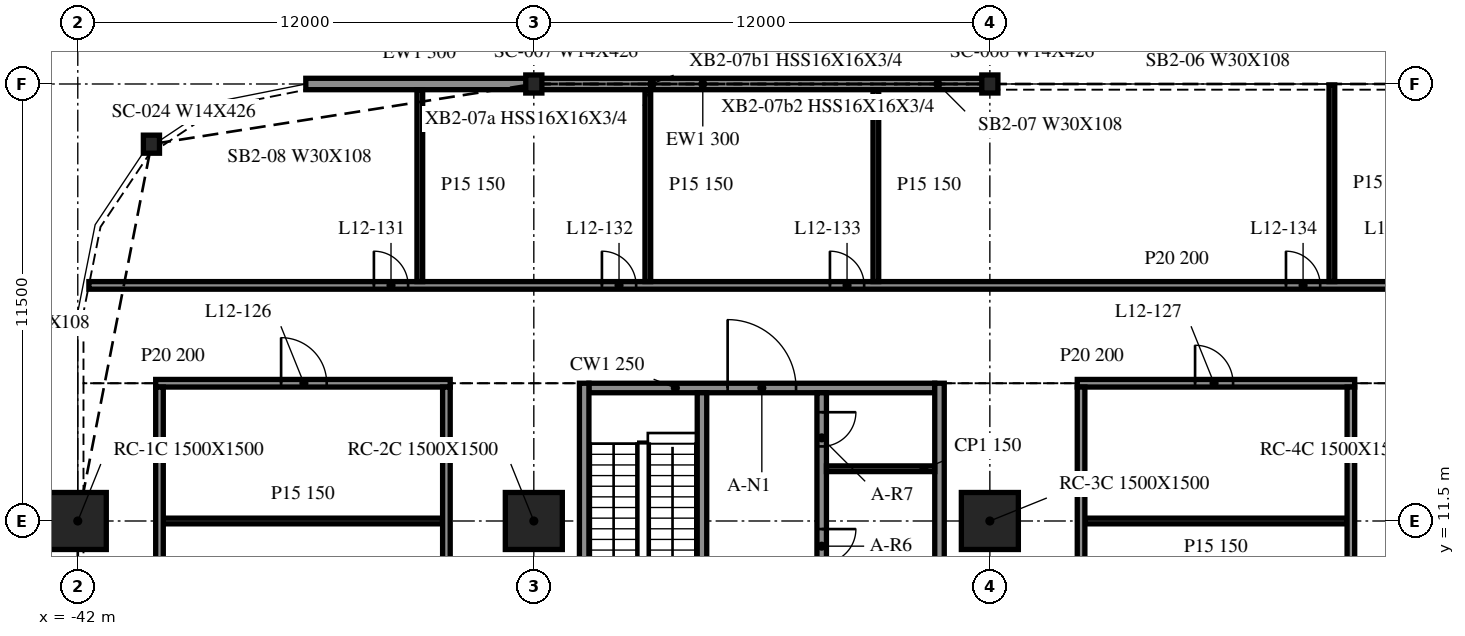
"""IFC4 building model, lengths in metres.
Left out: names, types, materials, properties, quantities, classifications, styles, units other than length and angle.
Written with IfcOpenShell. Run it as: python <this file> out.ifc"""

import sys

from ifc_helpers import new_model, si_unit, direction, frame, frame_2d, origin, origin_2d, place, context, subcontext, project, spatial, rectangle, i_section, extrude, element, fill, save


model = new_model("IFC4")
c1 = context("Model", 3, precision=1e-05, world=origin(), true_north=direction((0.0, 1.0)))
c2 = subcontext(c1, "Body", "Model", "MODEL_VIEW")
j1 = project(units=[si_unit("LENGTHUNIT", "METRE"), si_unit("PLANEANGLEUNIT", "RADIAN")], contexts=[c1])
p1 = place(None, origin())
s1 = spatial("IfcSite", under=j1, at=p1, CompositionType="ELEMENT")
p2 = place(p1, origin())
s2 = spatial("IfcBuilding", under=s1, at=p2, CompositionType="ELEMENT")
p3 = place(p2, frame((0.0, 0.0, 54.6)))
s3 = spatial("IfcBuildingStorey", under=s2, at=p3, CompositionType="ELEMENT", Elevation=54.6)
for number, where, z_axis, x_axis in (
    (1, (-42.0, 11.5, -0.34), (0.0, 0.0, 1.0), (1.0, 0.0, 0.0)),
    (2, (-30.0, 11.5, -0.34), (0.0, 0.0, 1.0), (1.0, 0.0, 0.0)),
    (3, (-18.0, 11.5, -0.34), (0.0, 0.0, 1.0), (1.0, 0.0, 0.0)),
):
    element("IfcColumn", number, at=place(p3, frame(where, z_axis=z_axis, x_axis=x_axis)), inside=s3, PredefinedType="COLUMN", context=c2, shape_type="SweptSolid", body=[
        extrude(rectangle(XDim=1.5, YDim=1.5, at=origin_2d()), origin(), (0.0, 0.0, 1.0), 4.3),
    ])
for number, where, z_axis, x_axis in (
    (4, (-18.0, 23.0, -0.34), (0.0, 0.0, 1.0), (1.0, 0.0, 0.0)),
    (5, (-30.0, 23.0, -0.34), (0.0, 0.0, 1.0), (1.0, 0.0, 0.0)),
    (6, (-40.062, 21.416, -0.34), (0.0, 0.0, 1.0), (1.0, 0.0, 0.0)),
):
    element("IfcColumn", number, at=place(p3, frame(where, z_axis=z_axis, x_axis=x_axis)), inside=s3, PredefinedType="COLUMN", context=c2, shape_type="SweptSolid", body=[
        extrude(i_section(OverallWidth=0.424, OverallDepth=0.475, WebThickness=0.048, FlangeThickness=0.077, at=origin_2d()), origin(), (0.0, 0.0, 1.0), 4.3),
    ])
p4 = place(p3, frame((-18.024, 23.0, 0.0), z_axis=(0.0, 0.0, 1.0), x_axis=(-1.0, 0.0, 0.0)))
e7 = element("IfcWall", 7, at=p4, inside=s3, PredefinedType="NOTDEFINED", context=c2, shape_type="SweptSolid", body=[
    extrude(rectangle(XDim=11.952, YDim=0.3, at=frame_2d((5.976, 0.0))), origin(), (0.0, 0.0, 1.0), 3.203),
])
p5 = place(p3, frame((-30.024, 23.0, 0.0), z_axis=(0.0, 0.0, 1.0), x_axis=(-1.0, 0.0, 0.0)))
e8 = element("IfcWall", 8, at=p5, inside=s3, PredefinedType="NOTDEFINED", context=c2, shape_type="SweptSolid", body=[
    extrude(rectangle(XDim=5.976, YDim=0.3, at=frame_2d((2.988, 0.0))), origin(), (0.0, 0.0, 1.0), 3.203),
])
for number, where, z_axis, x_axis in (
    (9, (-28.675, 15.125, 0.0), (0.0, 0.0, 1.0), (0.0, -1.0, 0.0)),
    (10, (-19.325, -9.125, 0.0), (0.0, 0.0, 1.0), (0.0, 1.0, 0.0)),
):
    element("IfcWall", number, at=place(p3, frame(where, z_axis=z_axis, x_axis=x_axis)), inside=s3, PredefinedType="SOLIDWALL", context=c2, shape_type="SweptSolid", body=[
        extrude(rectangle(XDim=24.25, YDim=0.25, at=frame_2d((12.125, 0.0))), origin(), (0.0, 0.0, 1.0), 3.96),
    ])
p6 = place(p3, frame((-28.55, 15.0, 0.0), z_axis=(0.0, 0.0, 1.0), x_axis=(1.0, 0.0, 0.0)))
e11 = element("IfcWall", 11, at=p6, inside=s3, PredefinedType="SOLIDWALL", context=c2, shape_type="SweptSolid", body=[
    extrude(rectangle(XDim=9.1, YDim=0.25, at=frame_2d((4.55, 0.0))), origin(), (0.0, 0.0, 1.0), 3.96),
])
p7 = place(p6, frame((3.65, 0.0, 0.0)))
e12 = element("IfcOpeningElement", 12, at=p7, cuts=e11, PredefinedType="OPENING", context=c2, shape_type="SweptSolid", body=[
    extrude(rectangle(XDim=1.8, YDim=2.1, at=frame_2d((0.9, 1.05))), frame((0.0, 0.135, 0.0), z_axis=(0.0, -1.0, 0.0), x_axis=(1.0, 0.0, 0.0)), (0.0, 0.0, 1.0), 0.27),
])
p8 = place(p3, frame((-25.575, 14.875, 0.0), z_axis=(0.0, 0.0, 1.0), x_axis=(0.0, -1.0, 0.0)))
e13 = element("IfcWall", 13, at=p8, inside=s3, PredefinedType="SOLIDWALL", context=c2, shape_type="SweptSolid", body=[
    extrude(rectangle(XDim=6.25, YDim=0.25, at=frame_2d((3.125, 0.0))), origin(), (0.0, 0.0, 1.0), 3.96),
])
p9 = place(p8, frame((4.85, 0.0, 0.0)))
e14 = element("IfcOpeningElement", 14, at=p9, cuts=e13, PredefinedType="OPENING", context=c2, shape_type="SweptSolid", body=[
    extrude(rectangle(XDim=1.0, YDim=2.1, at=frame_2d((0.5, 1.05))), frame((0.0, 0.135, 0.0), z_axis=(0.0, -1.0, 0.0), x_axis=(1.0, 0.0, 0.0)), (0.0, 0.0, 1.0), 0.27),
])
p10 = place(p3, frame((-22.425, 14.875, 0.0), z_axis=(0.0, 0.0, 1.0), x_axis=(0.0, -1.0, 0.0)))
e15 = element("IfcWall", 15, at=p10, inside=s3, PredefinedType="SOLIDWALL", context=c2, shape_type="SweptSolid", body=[
    extrude(rectangle(XDim=23.75, YDim=0.25, at=frame_2d((11.875, 0.0))), origin(), (0.0, 0.0, 1.0), 3.96),
])
p11 = place(p10, frame((15.45, 0.0, 0.0)))
e16 = element("IfcOpeningElement", 16, at=p11, cuts=e15, PredefinedType="OPENING", context=c2, shape_type="SweptSolid", body=[
    extrude(rectangle(XDim=1.1, YDim=2.1, at=frame_2d((0.55, 1.05))), frame((0.0, 0.135, 0.0), z_axis=(0.0, -1.0, 0.0), x_axis=(1.0, 0.0, 0.0)), (0.0, 0.0, 1.0), 0.27),
])
p12 = place(p10, frame((12.7, 0.0, 0.0)))
e17 = element("IfcOpeningElement", 17, at=p12, cuts=e15, PredefinedType="OPENING", context=c2, shape_type="SweptSolid", body=[
    extrude(rectangle(XDim=1.1, YDim=2.1, at=frame_2d((0.55, 1.05))), frame((0.0, 0.135, 0.0), z_axis=(0.0, -1.0, 0.0), x_axis=(1.0, 0.0, 0.0)), (0.0, 0.0, 1.0), 0.27),
])
p13 = place(p10, frame((22.337, 0.0, 0.0)))
e18 = element("IfcOpeningElement", 18, at=p13, cuts=e15, PredefinedType="OPENING", context=c2, shape_type="SweptSolid", body=[
    extrude(rectangle(XDim=0.9, YDim=2.1, at=frame_2d((0.45, 1.05))), frame((0.0, 0.135, 0.0), z_axis=(0.0, -1.0, 0.0), x_axis=(1.0, 0.0, 0.0)), (0.0, 0.0, 1.0), 0.27),
])
p14 = place(p10, frame((20.3, 0.0, 0.0)))
e19 = element("IfcOpeningElement", 19, at=p14, cuts=e15, PredefinedType="OPENING", context=c2, shape_type="SweptSolid", body=[
    extrude(rectangle(XDim=0.9, YDim=2.1, at=frame_2d((0.45, 1.05))), frame((0.0, 0.135, 0.0), z_axis=(0.0, -1.0, 0.0), x_axis=(1.0, 0.0, 0.0)), (0.0, 0.0, 1.0), 0.27),
])
p15 = place(p10, frame((18.262, 0.0, 0.0)))
e20 = element("IfcOpeningElement", 20, at=p15, cuts=e15, PredefinedType="OPENING", context=c2, shape_type="SweptSolid", body=[
    extrude(rectangle(XDim=0.9, YDim=2.1, at=frame_2d((0.45, 1.05))), frame((0.0, 0.135, 0.0), z_axis=(0.0, -1.0, 0.0), x_axis=(1.0, 0.0, 0.0)), (0.0, 0.0, 1.0), 0.27),
])
p16 = place(p10, frame((3.587, 0.0, 0.0)))
e21 = element("IfcOpeningElement", 21, at=p16, cuts=e15, PredefinedType="OPENING", context=c2, shape_type="SweptSolid", body=[
    extrude(rectangle(XDim=0.9, YDim=2.1, at=frame_2d((0.45, 1.05))), frame((0.0, 0.135, 0.0), z_axis=(0.0, -1.0, 0.0), x_axis=(1.0, 0.0, 0.0)), (0.0, 0.0, 1.0), 0.27),
])
p17 = place(p10, frame((0.512, 0.0, 0.0)))
e22 = element("IfcOpeningElement", 22, at=p17, cuts=e15, PredefinedType="OPENING", context=c2, shape_type="SweptSolid", body=[
    extrude(rectangle(XDim=0.9, YDim=2.1, at=frame_2d((0.45, 1.05))), frame((0.0, 0.135, 0.0), z_axis=(0.0, -1.0, 0.0), x_axis=(1.0, 0.0, 0.0)), (0.0, 0.0, 1.0), 0.27),
])
p18 = place(p3, frame((-22.3, 12.875, 0.0), z_axis=(0.0, 0.0, 1.0), x_axis=(1.0, 0.0, 0.0)))
e23 = element("IfcWall", 23, at=p18, inside=s3, PredefinedType="PARTITIONING", context=c2, shape_type="SweptSolid", body=[
    extrude(rectangle(XDim=2.85, YDim=0.15, at=frame_2d((1.425, 0.0))), origin(), (0.0, 0.0, 1.0), 3.96),
])
p19 = place(p3, frame((-39.75, 11.5, 0.0), z_axis=(0.0, 0.0, 1.0), x_axis=(1.0, 0.0, 0.0)))
e24 = element("IfcWall", 24, at=p19, inside=s3, PredefinedType="PARTITIONING", context=c2, shape_type="SweptSolid", body=[
    extrude(rectangle(XDim=7.35, YDim=0.15, at=frame_2d((3.675, 0.0))), origin(), (0.0, 0.0, 1.0), 3.96),
])
p20 = place(p3, frame((-15.5, 11.5, 0.0), z_axis=(0.0, 0.0, 1.0), x_axis=(1.0, 0.0, 0.0)))
e25 = element("IfcWall", 25, at=p20, inside=s3, PredefinedType="PARTITIONING", context=c2, shape_type="SweptSolid", body=[
    extrude(rectangle(XDim=6.9, YDim=0.15, at=frame_2d((3.45, 0.0))), origin(), (0.0, 0.0, 1.0), 3.96),
])
p21 = place(p3, frame((-39.95, 15.125, 0.0), z_axis=(0.0, 0.0, 1.0), x_axis=(1.0, 0.0, 0.0)))
e26 = element("IfcWall", 26, at=p21, inside=s3, PredefinedType="PARTITIONING", context=c2, shape_type="SweptSolid", body=[
    extrude(rectangle(XDim=7.75, YDim=0.2, at=frame_2d((3.875, 0.0))), origin(), (0.0, 0.0, 1.0), 3.96),
])
p22 = place(p21, frame((3.3, 0.0, 0.0)))
e27 = element("IfcOpeningElement", 27, at=p22, cuts=e26, PredefinedType="OPENING", context=c2, shape_type="SweptSolid", body=[
    extrude(rectangle(XDim=1.2, YDim=2.1, at=frame_2d((0.6, 1.05))), frame((0.0, 0.11, 0.0), z_axis=(0.0, -1.0, 0.0), x_axis=(1.0, 0.0, 0.0)), (0.0, 0.0, 1.0), 0.22),
])
p23 = place(p3, frame((-15.7, 15.125, 0.0), z_axis=(0.0, 0.0, 1.0), x_axis=(1.0, 0.0, 0.0)))
e28 = element("IfcWall", 28, at=p23, inside=s3, PredefinedType="PARTITIONING", context=c2, shape_type="SweptSolid", body=[
    extrude(rectangle(XDim=7.3, YDim=0.2, at=frame_2d((3.65, 0.0))), origin(), (0.0, 0.0, 1.0), 3.96),
])
p24 = place(p23, frame((3.1, 0.0, 0.0)))
e29 = element("IfcOpeningElement", 29, at=p24, cuts=e28, PredefinedType="OPENING", context=c2, shape_type="SweptSolid", body=[
    extrude(rectangle(XDim=1.0, YDim=2.1, at=frame_2d((0.5, 1.05))), frame((0.0, 0.11, 0.0), z_axis=(0.0, -1.0, 0.0), x_axis=(1.0, 0.0, 0.0)), (0.0, 0.0, 1.0), 0.22),
])
p25 = place(p3, frame((-41.708, 17.7, 0.0), z_axis=(0.0, 0.0, 1.0), x_axis=(1.0, 0.0, 0.0)))
e30 = element("IfcWall", 30, at=p25, inside=s3, PredefinedType="PARTITIONING", context=c2, shape_type="SweptSolid", body=[
    extrude(rectangle(XDim=95.416, YDim=0.2, at=frame_2d((47.708, 0.0))), origin(), (0.0, 0.0, 1.0), 3.96),
])
p26 = place(p25, frame((7.5, 0.0, 0.0)))
e31 = element("IfcOpeningElement", 31, at=p26, cuts=e30, PredefinedType="OPENING", context=c2, shape_type="SweptSolid", body=[
    extrude(rectangle(XDim=0.9, YDim=2.1, at=frame_2d((0.45, 1.05))), frame((0.0, 0.11, 0.0), z_axis=(0.0, -1.0, 0.0), x_axis=(1.0, 0.0, 0.0)), (0.0, 0.0, 1.0), 0.22),
])
p27 = place(p25, frame((13.5, 0.0, 0.0)))
e32 = element("IfcOpeningElement", 32, at=p27, cuts=e30, PredefinedType="OPENING", context=c2, shape_type="SweptSolid", body=[
    extrude(rectangle(XDim=0.9, YDim=2.1, at=frame_2d((0.45, 1.05))), frame((0.0, 0.11, 0.0), z_axis=(0.0, -1.0, 0.0), x_axis=(1.0, 0.0, 0.0)), (0.0, 0.0, 1.0), 0.22),
])
p28 = place(p25, frame((19.5, 0.0, 0.0)))
e33 = element("IfcOpeningElement", 33, at=p28, cuts=e30, PredefinedType="OPENING", context=c2, shape_type="SweptSolid", body=[
    extrude(rectangle(XDim=0.9, YDim=2.1, at=frame_2d((0.45, 1.05))), frame((0.0, 0.11, 0.0), z_axis=(0.0, -1.0, 0.0), x_axis=(1.0, 0.0, 0.0)), (0.0, 0.0, 1.0), 0.22),
])
p29 = place(p25, frame((31.5, 0.0, 0.0)))
e34 = element("IfcOpeningElement", 34, at=p29, cuts=e30, PredefinedType="OPENING", context=c2, shape_type="SweptSolid", body=[
    extrude(rectangle(XDim=0.9, YDim=2.1, at=frame_2d((0.45, 1.05))), frame((0.0, 0.11, 0.0), z_axis=(0.0, -1.0, 0.0), x_axis=(1.0, 0.0, 0.0)), (0.0, 0.0, 1.0), 0.22),
])
p30 = place(p25, frame((34.5, 0.0, 0.0)))
e35 = element("IfcOpeningElement", 35, at=p30, cuts=e30, PredefinedType="OPENING", context=c2, shape_type="SweptSolid", body=[
    extrude(rectangle(XDim=0.9, YDim=2.1, at=frame_2d((0.45, 1.05))), frame((0.0, 0.11, 0.0), z_axis=(0.0, -1.0, 0.0), x_axis=(1.0, 0.0, 0.0)), (0.0, 0.0, 1.0), 0.22),
])
p31 = place(p25, frame((43.5, 0.0, 0.0)))
e36 = element("IfcOpeningElement", 36, at=p31, cuts=e30, PredefinedType="OPENING", context=c2, shape_type="SweptSolid", body=[
    extrude(rectangle(XDim=0.9, YDim=2.1, at=frame_2d((0.45, 1.05))), frame((0.0, 0.11, 0.0), z_axis=(0.0, -1.0, 0.0), x_axis=(1.0, 0.0, 0.0)), (0.0, 0.0, 1.0), 0.22),
])
p32 = place(p25, frame((47.3, 0.0, 0.0)))
e37 = element("IfcOpeningElement", 37, at=p32, cuts=e30, PredefinedType="OPENING", context=c2, shape_type="SweptSolid", body=[
    extrude(rectangle(XDim=0.9, YDim=2.1, at=frame_2d((0.45, 1.05))), frame((0.0, 0.11, 0.0), z_axis=(0.0, -1.0, 0.0), x_axis=(1.0, 0.0, 0.0)), (0.0, 0.0, 1.0), 0.22),
])
p33 = place(p25, frame((51.1, 0.0, 0.0)))
e38 = element("IfcOpeningElement", 38, at=p33, cuts=e30, PredefinedType="OPENING", context=c2, shape_type="SweptSolid", body=[
    extrude(rectangle(XDim=0.9, YDim=2.1, at=frame_2d((0.45, 1.05))), frame((0.0, 0.11, 0.0), z_axis=(0.0, -1.0, 0.0), x_axis=(1.0, 0.0, 0.0)), (0.0, 0.0, 1.0), 0.22),
])
p34 = place(p25, frame((57.1, 0.0, 0.0)))
e39 = element("IfcOpeningElement", 39, at=p34, cuts=e30, PredefinedType="OPENING", context=c2, shape_type="SweptSolid", body=[
    extrude(rectangle(XDim=0.9, YDim=2.1, at=frame_2d((0.45, 1.05))), frame((0.0, 0.11, 0.0), z_axis=(0.0, -1.0, 0.0), x_axis=(1.0, 0.0, 0.0)), (0.0, 0.0, 1.0), 0.22),
])
p35 = place(p25, frame((69.1, 0.0, 0.0)))
e40 = element("IfcOpeningElement", 40, at=p35, cuts=e30, PredefinedType="OPENING", context=c2, shape_type="SweptSolid", body=[
    extrude(rectangle(XDim=0.9, YDim=2.1, at=frame_2d((0.45, 1.05))), frame((0.0, 0.11, 0.0), z_axis=(0.0, -1.0, 0.0), x_axis=(1.0, 0.0, 0.0)), (0.0, 0.0, 1.0), 0.22),
])
p36 = place(p25, frame((72.1, 0.0, 0.0)))
e41 = element("IfcOpeningElement", 41, at=p36, cuts=e30, PredefinedType="OPENING", context=c2, shape_type="SweptSolid", body=[
    extrude(rectangle(XDim=0.9, YDim=2.1, at=frame_2d((0.45, 1.05))), frame((0.0, 0.11, 0.0), z_axis=(0.0, -1.0, 0.0), x_axis=(1.0, 0.0, 0.0)), (0.0, 0.0, 1.0), 0.22),
])
p37 = place(p25, frame((81.1, 0.0, 0.0)))
e42 = element("IfcOpeningElement", 42, at=p37, cuts=e30, PredefinedType="OPENING", context=c2, shape_type="SweptSolid", body=[
    extrude(rectangle(XDim=0.9, YDim=2.1, at=frame_2d((0.45, 1.05))), frame((0.0, 0.11, 0.0), z_axis=(0.0, -1.0, 0.0), x_axis=(1.0, 0.0, 0.0)), (0.0, 0.0, 1.0), 0.22),
])
p38 = place(p25, frame((87.1, 0.0, 0.0)))
e43 = element("IfcOpeningElement", 43, at=p38, cuts=e30, PredefinedType="OPENING", context=c2, shape_type="SweptSolid", body=[
    extrude(rectangle(XDim=0.9, YDim=2.1, at=frame_2d((0.45, 1.05))), frame((0.0, 0.11, 0.0), z_axis=(0.0, -1.0, 0.0), x_axis=(1.0, 0.0, 0.0)), (0.0, 0.0, 1.0), 0.22),
])
p39 = place(p3, frame((-39.85, -9.025, 0.0), z_axis=(0.0, 0.0, 1.0), x_axis=(0.0, 1.0, 0.0)))
e44 = element("IfcWall", 44, at=p39, inside=s3, PredefinedType="PARTITIONING", context=c2, shape_type="SweptSolid", body=[
    extrude(rectangle(XDim=24.05, YDim=0.2, at=frame_2d((12.025, 0.0))), origin(), (0.0, 0.0, 1.0), 3.96),
])
p40 = place(p39, frame((12.3, 0.0, 0.0)))
e45 = element("IfcOpeningElement", 45, at=p40, cuts=e44, PredefinedType="OPENING", context=c2, shape_type="SweptSolid", body=[
    extrude(rectangle(XDim=1.2, YDim=2.1, at=frame_2d((0.6, 1.05))), frame((0.0, 0.11, 0.0), z_axis=(0.0, -1.0, 0.0), x_axis=(1.0, 0.0, 0.0)), (0.0, 0.0, 1.0), 0.22),
])
p41 = place(p3, frame((-33.0, 17.8, 0.0), z_axis=(0.0, 0.0, 1.0), x_axis=(0.0, 1.0, 0.0)))
e46 = element("IfcWall", 46, at=p41, inside=s3, PredefinedType="PARTITIONING", context=c2, shape_type="SweptSolid", body=[
    extrude(rectangle(XDim=5.05, YDim=0.15, at=frame_2d((2.525, 0.0))), origin(), (0.0, 0.0, 1.0), 3.96),
])
p42 = place(p3, frame((-32.3, -9.025, 0.0), z_axis=(0.0, 0.0, 1.0), x_axis=(0.0, 1.0, 0.0)))
e47 = element("IfcWall", 47, at=p42, inside=s3, PredefinedType="PARTITIONING", context=c2, shape_type="SweptSolid", body=[
    extrude(rectangle(XDim=24.05, YDim=0.2, at=frame_2d((12.025, 0.0))), origin(), (0.0, 0.0, 1.0), 3.96),
])
for number, where, z_axis, x_axis in (
    (48, (-27.0, 17.8, 0.0), (0.0, 0.0, 1.0), (0.0, 1.0, 0.0)),
    (49, (-21.0, 17.8, 0.0), (0.0, 0.0, 1.0), (0.0, 1.0, 0.0)),
):
    element("IfcWall", number, at=place(p3, frame(where, z_axis=z_axis, x_axis=x_axis)), inside=s3, PredefinedType="PARTITIONING", context=c2, shape_type="SweptSolid", body=[
        extrude(rectangle(XDim=5.05, YDim=0.15, at=frame_2d((2.525, 0.0))), origin(), (0.0, 0.0, 1.0), 3.96),
    ])
p43 = place(p3, frame((-15.6, -9.025, 0.0), z_axis=(0.0, 0.0, 1.0), x_axis=(0.0, 1.0, 0.0)))
e50 = element("IfcWall", 50, at=p43, inside=s3, PredefinedType="PARTITIONING", context=c2, shape_type="SweptSolid", body=[
    extrude(rectangle(XDim=24.05, YDim=0.2, at=frame_2d((12.025, 0.0))), origin(), (0.0, 0.0, 1.0), 3.96),
])
p44 = place(p43, frame((12.3, 0.0, 0.0)))
e51 = element("IfcOpeningElement", 51, at=p44, cuts=e50, PredefinedType="OPENING", context=c2, shape_type="SweptSolid", body=[
    extrude(rectangle(XDim=1.0, YDim=2.1, at=frame_2d((0.5, 1.05))), frame((0.0, 0.11, 0.0), z_axis=(0.0, -1.0, 0.0), x_axis=(1.0, 0.0, 0.0)), (0.0, 0.0, 1.0), 0.22),
])
p45 = place(p3, frame((-9.0, 17.8, 0.0), z_axis=(0.0, 0.0, 1.0), x_axis=(0.0, 1.0, 0.0)))
e52 = element("IfcWall", 52, at=p45, inside=s3, PredefinedType="PARTITIONING", context=c2, shape_type="SweptSolid", body=[
    extrude(rectangle(XDim=5.175, YDim=0.15, at=frame_2d((2.587, 0.0))), origin(), (0.0, 0.0, 1.0), 3.96),
])
p46 = place(p3, frame((-8.5, -9.025, 0.0), z_axis=(0.0, 0.0, 1.0), x_axis=(0.0, 1.0, 0.0)))
e53 = element("IfcWall", 53, at=p46, inside=s3, PredefinedType="PARTITIONING", context=c2, shape_type="SweptSolid", body=[
    extrude(rectangle(XDim=24.05, YDim=0.2, at=frame_2d((12.025, 0.0))), origin(), (0.0, 0.0, 1.0), 3.96),
])
p47 = place(p7, origin())
e54 = element("IfcDoor", 54, at=p47, inside=s3, OperationType="DOUBLE_DOOR_SINGLE_SWING", PredefinedType="DOOR", context=c2, shape_type="SweptSolid", body=[
    extrude(rectangle(XDim=1.8, YDim=2.1, at=frame_2d((0.9, 1.05))), frame((0.0, 0.025, 0.0), z_axis=(0.0, -1.0, 0.0), x_axis=(1.0, 0.0, 0.0)), (0.0, 0.0, 1.0), 0.05),
])
fill(e12, e54)
p48 = place(p16, origin())
e55 = element("IfcDoor", 55, at=p48, inside=s3, OperationType="SINGLE_SWING_RIGHT", PredefinedType="DOOR", context=c2, shape_type="SweptSolid", body=[
    extrude(rectangle(XDim=0.9, YDim=2.1, at=frame_2d((0.45, 1.05))), frame((0.0, 0.025, 0.0), z_axis=(0.0, -1.0, 0.0), x_axis=(1.0, 0.0, 0.0)), (0.0, 0.0, 1.0), 0.05),
])
fill(e21, e55)
p49 = place(p17, origin())
e56 = element("IfcDoor", 56, at=p49, inside=s3, OperationType="SINGLE_SWING_LEFT", PredefinedType="DOOR", context=c2, shape_type="SweptSolid", body=[
    extrude(rectangle(XDim=0.9, YDim=2.1, at=frame_2d((0.45, 1.05))), frame((0.0, 0.025, 0.0), z_axis=(0.0, -1.0, 0.0), x_axis=(1.0, 0.0, 0.0)), (0.0, 0.0, 1.0), 0.05),
])
fill(e22, e56)
p50 = place(p22, origin())
e57 = element("IfcDoor", 57, at=p50, inside=s3, OperationType="SINGLE_SWING_LEFT", PredefinedType="DOOR", context=c2, shape_type="SweptSolid", body=[
    extrude(rectangle(XDim=1.2, YDim=2.1, at=frame_2d((0.6, 1.05))), frame((0.0, 0.025, 0.0), z_axis=(0.0, -1.0, 0.0), x_axis=(1.0, 0.0, 0.0)), (0.0, 0.0, 1.0), 0.05),
])
fill(e27, e57)
p51 = place(p24, origin())
e58 = element("IfcDoor", 58, at=p51, inside=s3, OperationType="SINGLE_SWING_RIGHT", PredefinedType="DOOR", context=c2, shape_type="SweptSolid", body=[
    extrude(rectangle(XDim=1.0, YDim=2.1, at=frame_2d((0.5, 1.05))), frame((0.0, 0.025, 0.0), z_axis=(0.0, -1.0, 0.0), x_axis=(1.0, 0.0, 0.0)), (0.0, 0.0, 1.0), 0.05),
])
fill(e29, e58)
p52 = place(p26, origin())
e59 = element("IfcDoor", 59, at=p52, inside=s3, OperationType="SINGLE_SWING_LEFT", PredefinedType="DOOR", context=c2, shape_type="SweptSolid", body=[
    extrude(rectangle(XDim=0.9, YDim=2.1, at=frame_2d((0.45, 1.05))), frame((0.0, 0.025, 0.0), z_axis=(0.0, -1.0, 0.0), x_axis=(1.0, 0.0, 0.0)), (0.0, 0.0, 1.0), 0.05),
])
fill(e31, e59)
p53 = place(p27, origin())
e60 = element("IfcDoor", 60, at=p53, inside=s3, OperationType="SINGLE_SWING_LEFT", PredefinedType="DOOR", context=c2, shape_type="SweptSolid", body=[
    extrude(rectangle(XDim=0.9, YDim=2.1, at=frame_2d((0.45, 1.05))), frame((0.0, 0.025, 0.0), z_axis=(0.0, -1.0, 0.0), x_axis=(1.0, 0.0, 0.0)), (0.0, 0.0, 1.0), 0.05),
])
fill(e32, e60)
p54 = place(p28, origin())
e61 = element("IfcDoor", 61, at=p54, inside=s3, OperationType="SINGLE_SWING_LEFT", PredefinedType="DOOR", context=c2, shape_type="SweptSolid", body=[
    extrude(rectangle(XDim=0.9, YDim=2.1, at=frame_2d((0.45, 1.05))), frame((0.0, 0.025, 0.0), z_axis=(0.0, -1.0, 0.0), x_axis=(1.0, 0.0, 0.0)), (0.0, 0.0, 1.0), 0.05),
])
fill(e33, e61)
p55 = place(p29, origin())
e62 = element("IfcDoor", 62, at=p55, inside=s3, OperationType="SINGLE_SWING_LEFT", PredefinedType="DOOR", context=c2, shape_type="SweptSolid", body=[
    extrude(rectangle(XDim=0.9, YDim=2.1, at=frame_2d((0.45, 1.05))), frame((0.0, 0.025, 0.0), z_axis=(0.0, -1.0, 0.0), x_axis=(1.0, 0.0, 0.0)), (0.0, 0.0, 1.0), 0.05),
])
fill(e34, e62)
save(model, sys.argv[1])
